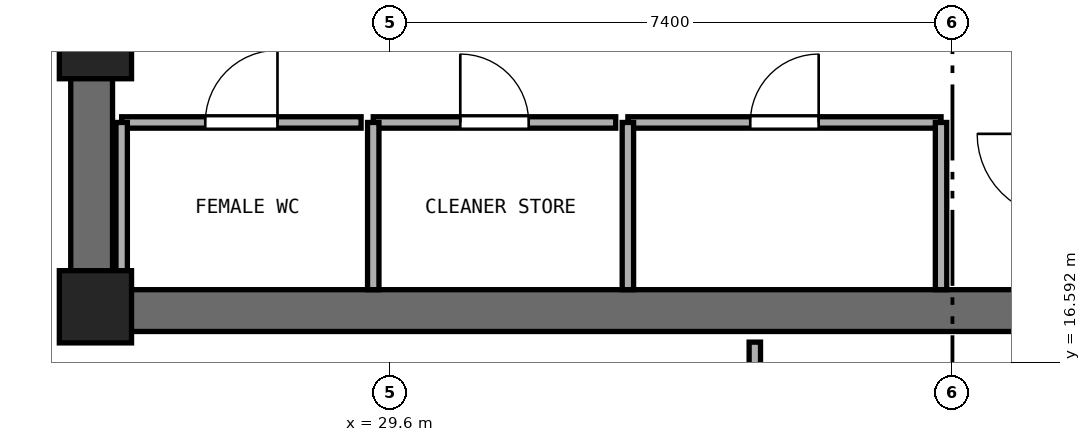
"""IFC4 building model, lengths in metres.
Left out: names, types, materials, properties, quantities, classifications, styles, units other than length and angle.
Written with IfcOpenShell. Run it as: python <this file> out.ifc"""

import sys

from ifc_helpers import new_model, si_unit, direction, frame, frame_2d, origin, origin_2d, place, context, subcontext, project, spatial, rectangle, extrude, element, fill, save


model = new_model("IFC4")
c1 = context("Model", 3, precision=1e-05, world=origin(), true_north=direction((0.0, 1.0)))
c2 = subcontext(c1, "Body", "Model", "MODEL_VIEW")
j1 = project(units=[si_unit("LENGTHUNIT", "METRE"), si_unit("PLANEANGLEUNIT", "RADIAN")], contexts=[c1])
p1 = place(None, origin())
s1 = spatial("IfcSite", under=j1, at=p1, CompositionType="ELEMENT")
p2 = place(p1, origin())
s2 = spatial("IfcBuilding", under=s1, at=p2, CompositionType="ELEMENT")
p3 = place(p2, frame((0.0, 0.0, 132.6)))
s3 = spatial("IfcBuildingStorey", under=s2, at=p3, CompositionType="ELEMENT", Elevation=132.6)
p4 = place(p3, frame((25.4, 17.275, 0.0), z_axis=(0.0, 0.0, 1.0), x_axis=(1.0, 0.0, 0.0)))
e1 = element("IfcWall", 1, at=p4, inside=s3, PredefinedType="SHEAR", context=c2, shape_type="SweptSolid", body=[
    extrude(rectangle(XDim=23.2, YDim=0.55, at=frame_2d((11.6, 0.0))), origin(), (0.0, 0.0, 1.0), 3.54),
])
p5 = place(p3, frame((25.675, 17.55, 0.0), z_axis=(0.0, 0.0, 1.0), x_axis=(0.0, 1.0, 0.0)))
e2 = element("IfcWall", 2, at=p5, inside=s3, PredefinedType="SHEAR", context=c2, shape_type="SweptSolid", body=[
    extrude(rectangle(XDim=15.3, YDim=0.55, at=frame_2d((7.65, 0.0))), origin(), (0.0, 0.0, 1.0), 3.54),
])
p6 = place(p5, frame((6.9, 0.0, 0.0)))
e3 = element("IfcOpeningElement", 3, at=p6, cuts=e2, PredefinedType="OPENING", context=c2, shape_type="SweptSolid", body=[
    extrude(rectangle(XDim=1.5, YDim=2.15, at=frame_2d((0.75, 1.075))), frame((0.0, 0.285, 0.0), z_axis=(0.0, -1.0, 0.0), x_axis=(1.0, 0.0, 0.0)), (0.0, 0.0, 1.0), 0.57),
])
for number, where, z_axis, x_axis in (
    (4, (25.725, 17.325, 0.0), (0.0, 0.0, 1.0), (1.0, 0.0, 0.0)),
    (5, (25.725, 20.8, 0.0), (0.0, 0.0, 1.0), (1.0, 0.0, 0.0)),
):
    element("IfcColumn", number, at=place(p3, frame(where, z_axis=z_axis, x_axis=x_axis)), inside=s3, PredefinedType="PILASTER", context=c2, shape_type="SweptSolid", body=[
        extrude(rectangle(XDim=0.95, YDim=0.95, at=origin_2d()), origin(), (0.0, 0.0, 1.0), 3.8),
    ])
p7 = place(p3, frame((26.07, 19.75, 0.0), z_axis=(0.0, 0.0, 1.0), x_axis=(1.0, 0.0, 0.0)))
e6 = element("IfcWall", 6, at=p7, inside=s3, PredefinedType="PARTITIONING", context=c2, shape_type="SweptSolid", body=[
    extrude(rectangle(XDim=3.15, YDim=0.15, at=frame_2d((1.575, 0.0))), origin(), (0.0, 0.0, 1.0), 3.54),
])
p8 = place(p7, frame((1.1, 0.0, 0.0)))
e7 = element("IfcOpeningElement", 7, at=p8, cuts=e6, PredefinedType="OPENING", context=c2, shape_type="SweptSolid", body=[
    extrude(rectangle(XDim=0.95, YDim=2.1, at=frame_2d((0.475, 1.05))), frame((0.0, 0.085, 0.0), z_axis=(0.0, -1.0, 0.0), x_axis=(1.0, 0.0, 0.0)), (0.0, 0.0, 1.0), 0.17),
])
p9 = place(p3, frame((26.07, 17.55, 0.0), z_axis=(0.0, 0.0, 1.0), x_axis=(0.0, 1.0, 0.0)))
e8 = element("IfcWall", 8, at=p9, inside=s3, PredefinedType="PARTITIONING", context=c2, shape_type="SweptSolid", body=[
    extrude(rectangle(XDim=2.2, YDim=0.15, at=frame_2d((1.1, 0.0))), origin(), (0.0, 0.0, 1.0), 2.64),
])
p10 = place(p3, frame((29.38, 19.75, 0.0), z_axis=(0.0, 0.0, 1.0), x_axis=(1.0, 0.0, 0.0)))
e9 = element("IfcWall", 9, at=p10, inside=s3, PredefinedType="PARTITIONING", context=c2, shape_type="SweptSolid", body=[
    extrude(rectangle(XDim=3.19, YDim=0.15, at=frame_2d((1.595, 0.0))), origin(), (0.0, 0.0, 1.0), 3.54),
])
p11 = place(p10, frame((1.145, 0.0, 0.0)))
e10 = element("IfcOpeningElement", 10, at=p11, cuts=e9, PredefinedType="OPENING", context=c2, shape_type="SweptSolid", body=[
    extrude(rectangle(XDim=0.9, YDim=2.1, at=frame_2d((0.45, 1.05))), frame((0.0, 0.085, 0.0), z_axis=(0.0, -1.0, 0.0), x_axis=(1.0, 0.0, 0.0)), (0.0, 0.0, 1.0), 0.17),
])
p12 = place(p3, frame((29.38, 17.55, 0.0), z_axis=(0.0, 0.0, 1.0), x_axis=(0.0, 1.0, 0.0)))
e11 = element("IfcWall", 11, at=p12, inside=s3, PredefinedType="PARTITIONING", context=c2, shape_type="SweptSolid", body=[
    extrude(rectangle(XDim=2.2, YDim=0.15, at=frame_2d((1.1, 0.0))), origin(), (0.0, 0.0, 1.0), 3.54),
])
p13 = place(p3, frame((32.73, 19.75, 0.0), z_axis=(0.0, 0.0, 1.0), x_axis=(1.0, 0.0, 0.0)))
e12 = element("IfcWall", 12, at=p13, inside=s3, PredefinedType="PARTITIONING", context=c2, shape_type="SweptSolid", body=[
    extrude(rectangle(XDim=4.12, YDim=0.15, at=frame_2d((2.06, 0.0))), origin(), (0.0, 0.0, 1.0), 3.54),
])
p14 = place(p13, frame((1.61, 0.0, 0.0)))
e13 = element("IfcOpeningElement", 13, at=p14, cuts=e12, PredefinedType="OPENING", context=c2, shape_type="SweptSolid", body=[
    extrude(rectangle(XDim=0.9, YDim=2.1, at=frame_2d((0.45, 1.05))), frame((0.0, 0.085, 0.0), z_axis=(0.0, -1.0, 0.0), x_axis=(1.0, 0.0, 0.0)), (0.0, 0.0, 1.0), 0.17),
])
for number, where, z_axis, x_axis in (
    (14, (32.73, 17.55, 0.0), (0.0, 0.0, 1.0), (0.0, 1.0, 0.0)),
    (15, (36.85, 17.55, 0.0), (0.0, 0.0, 1.0), (0.0, 1.0, 0.0)),
):
    element("IfcWall", number, at=place(p3, frame(where, z_axis=z_axis, x_axis=x_axis)), inside=s3, PredefinedType="PARTITIONING", context=c2, shape_type="SweptSolid", body=[
        extrude(rectangle(XDim=2.2, YDim=0.15, at=frame_2d((1.1, 0.0))), origin(), (0.0, 0.0, 1.0), 3.54),
    ])
p15 = place(p3, frame((34.4, 13.7, 0.0), z_axis=(0.0, 0.0, 1.0), x_axis=(0.0, 1.0, 0.0)))
e16 = element("IfcWall", 16, at=p15, inside=s3, PredefinedType="PARTITIONING", context=c2, shape_type="SweptSolid", body=[
    extrude(rectangle(XDim=3.16, YDim=0.15, at=frame_2d((1.58, 0.0))), origin(), (0.0, 0.0, 1.0), 3.54),
])
p16 = place(p15, frame((1.13, 0.0, 0.0)))
e17 = element("IfcOpeningElement", 17, at=p16, cuts=e16, PredefinedType="OPENING", context=c2, shape_type="SweptSolid", body=[
    extrude(rectangle(XDim=0.9, YDim=2.1, at=frame_2d((0.45, 1.05))), frame((0.0, 0.085, 0.0), z_axis=(0.0, -1.0, 0.0), x_axis=(1.0, 0.0, 0.0)), (0.0, 0.0, 1.0), 0.17),
])
p17 = place(p8, origin())
e18 = element("IfcDoor", 18, at=p17, inside=s3, OperationType="SINGLE_SWING_RIGHT", PredefinedType="DOOR", context=c2, shape_type="SweptSolid", body=[
    extrude(rectangle(XDim=0.95, YDim=2.1, at=frame_2d((0.475, 1.05))), frame((0.0, 0.025, 0.0), z_axis=(0.0, -1.0, 0.0), x_axis=(1.0, 0.0, 0.0)), (0.0, 0.0, 1.0), 0.05),
])
fill(e7, e18)
p18 = place(p11, origin())
e19 = element("IfcDoor", 19, at=p18, inside=s3, OperationType="SINGLE_SWING_LEFT", PredefinedType="DOOR", context=c2, shape_type="SweptSolid", body=[
    extrude(rectangle(XDim=0.9, YDim=2.1, at=frame_2d((0.45, 1.05))), frame((0.0, 0.025, 0.0), z_axis=(0.0, -1.0, 0.0), x_axis=(1.0, 0.0, 0.0)), (0.0, 0.0, 1.0), 0.05),
])
fill(e10, e19)
p19 = place(p14, origin())
e20 = element("IfcDoor", 20, at=p19, inside=s3, OperationType="SINGLE_SWING_RIGHT", PredefinedType="DOOR", context=c2, shape_type="SweptSolid", body=[
    extrude(rectangle(XDim=0.9, YDim=2.1, at=frame_2d((0.45, 1.05))), frame((0.0, 0.025, 0.0), z_axis=(0.0, -1.0, 0.0), x_axis=(1.0, 0.0, 0.0)), (0.0, 0.0, 1.0), 0.05),
])
fill(e13, e20)
save(model, sys.argv[1])
